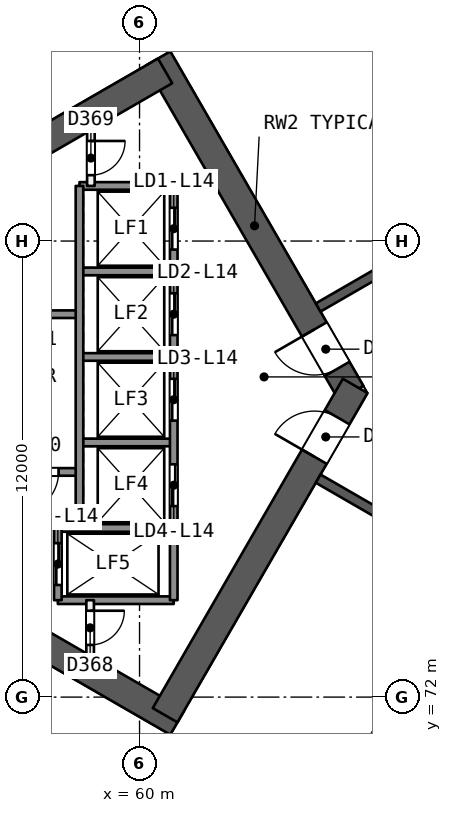
"""IFC4 building model, lengths in metres.
Left out: names, types, materials, properties, quantities, classifications, styles, units other than length and angle.
Written with IfcOpenShell. Run it as: python <this file> out.ifc"""

import sys

from ifc_helpers import new_model, si_unit, direction, frame, frame_2d, origin, place, context, subcontext, project, spatial, rectangle, extrude, element, fill, save


model = new_model("IFC4")
c1 = context("Model", 3, precision=1e-05, world=origin(), true_north=direction((0.0, 1.0)))
c2 = subcontext(c1, "Body", "Model", "MODEL_VIEW")
j1 = project(units=[si_unit("LENGTHUNIT", "METRE"), si_unit("PLANEANGLEUNIT", "RADIAN")], contexts=[c1])
p1 = place(None, origin())
s1 = spatial("IfcSite", under=j1, at=p1, CompositionType="ELEMENT")
p2 = place(p1, origin())
s2 = spatial("IfcBuilding", under=s1, at=p2, CompositionType="ELEMENT")
p3 = place(p2, frame((0.0, 0.0, 64.7)))
s3 = spatial("IfcBuildingStorey", under=s2, at=p3, CompositionType="ELEMENT", Elevation=64.7)
p4 = place(p3, frame((65.567, 80.0, 0.0), z_axis=(0.0, 0.0, 1.0), x_axis=(-0.499988615364, 0.866031976607, 0.0)))
e1 = element("IfcWall", 1, at=p4, inside=s3, PredefinedType="SHEAR", context=c2, shape_type="SweptSolid", body=[
    extrude(rectangle(XDim=10.163, YDim=0.75, at=frame_2d((5.082, 0.0))), origin(), (0.0, 0.0, 1.0), 3.7),
])
p5 = place(p4, frame((0.733, 0.0, 0.0)))
e2 = element("IfcOpeningElement", 2, at=p5, cuts=e1, PredefinedType="OPENING", context=c2, shape_type="SweptSolid", body=[
    extrude(rectangle(XDim=1.2, YDim=2.1, at=frame_2d((0.6, 1.05))), frame((0.0, 0.385, 0.0), z_axis=(0.0, -1.0, 0.0), x_axis=(1.0, 0.0, 0.0)), (0.0, 0.0, 1.0), 0.771),
])
p6 = place(p3, frame((60.673, 88.477, 0.0), z_axis=(0.0, 0.0, 1.0), x_axis=(-0.8660248072, -0.500001033313, 0.0)))
e3 = element("IfcWall", 3, at=p6, inside=s3, PredefinedType="SHEAR", context=c2, shape_type="SweptSolid", body=[
    extrude(rectangle(XDim=13.958, YDim=0.75, at=frame_2d((6.979, 0.0))), origin(), (0.0, 0.0, 1.0), 3.7),
])
p7 = place(p3, frame((48.772, 78.394, 0.0), z_axis=(0.0, 0.0, 1.0), x_axis=(0.866028339916, -0.499994914436, 0.0)))
e4 = element("IfcWall", 4, at=p7, inside=s3, PredefinedType="SHEAR", context=c2, shape_type="SweptSolid", body=[
    extrude(rectangle(XDim=14.117, YDim=0.75, at=frame_2d((7.059, 0.0))), origin(), (0.0, 0.0, 1.0), 3.7),
])
p8 = place(p3, frame((60.673, 71.523, 0.0), z_axis=(0.0, 0.0, 1.0), x_axis=(0.499997052475, 0.866027105532, 0.0)))
e5 = element("IfcWall", 5, at=p8, inside=s3, PredefinedType="SHEAR", context=c2, shape_type="SweptSolid", body=[
    extrude(rectangle(XDim=10.005, YDim=0.75, at=frame_2d((5.002, 0.0))), origin(), (0.0, 0.0, 1.0), 3.7),
])
p9 = place(p8, frame((7.855, 0.0, 0.0)))
e6 = element("IfcOpeningElement", 6, at=p9, cuts=e5, PredefinedType="OPENING", context=c2, shape_type="SweptSolid", body=[
    extrude(rectangle(XDim=1.2, YDim=2.1, at=frame_2d((0.6, 1.05))), frame((0.0, 0.385, 0.0), z_axis=(0.0, -1.0, 0.0), x_axis=(1.0, 0.0, 0.0)), (0.0, 0.0, 1.0), 0.771),
])
p10 = place(p3, frame((78.2, 90.046, 0.0), z_axis=(0.0, 0.0, 1.0), x_axis=(-0.866026492143, -0.499998114903, 0.0)))
e7 = element("IfcWall", 7, at=p10, inside=s3, PredefinedType="SHEAR", context=c2, shape_type="SweptSolid", body=[
    extrude(rectangle(XDim=15.588, YDim=0.25, at=frame_2d((7.794, 0.0))), origin(), (0.0, 0.0, 1.0), 3.2),
])
p11 = place(p10, frame((2.618, 0.0, 0.0)))
e8 = element("IfcOpeningElement", 8, at=p11, cuts=e7, PredefinedType="OPENING", context=c2, shape_type="SweptSolid", body=[
    extrude(rectangle(XDim=1.0, YDim=2.1, at=frame_2d((0.5, 1.05))), frame((0.0, 0.135, 0.0), z_axis=(0.0, -1.0, 0.0), x_axis=(1.0, 0.0, 0.0)), (0.0, 0.0, 1.0), 0.271),
])
p12 = place(p10, frame((8.133, 0.0, 0.0)))
e9 = element("IfcOpeningElement", 9, at=p12, cuts=e7, PredefinedType="OPENING", context=c2, shape_type="SweptSolid", body=[
    extrude(rectangle(XDim=1.0, YDim=2.1, at=frame_2d((0.5, 1.05))), frame((0.0, 0.135, 0.0), z_axis=(0.0, -1.0, 0.0), x_axis=(1.0, 0.0, 0.0)), (0.0, 0.0, 1.0), 0.271),
])
p13 = place(p10, frame((11.971, 0.0, 0.0)))
e10 = element("IfcOpeningElement", 10, at=p13, cuts=e7, PredefinedType="OPENING", context=c2, shape_type="SweptSolid", body=[
    extrude(rectangle(XDim=1.0, YDim=2.1, at=frame_2d((0.5, 1.05))), frame((0.0, 0.135, 0.0), z_axis=(0.0, -1.0, 0.0), x_axis=(1.0, 0.0, 0.0)), (0.0, 0.0, 1.0), 0.271),
])
p14 = place(p3, frame((64.7, 77.748, 0.0), z_axis=(0.0, 0.0, 1.0), x_axis=(0.866026492143, -0.499998114903, 0.0)))
e11 = element("IfcWall", 11, at=p14, inside=s3, PredefinedType="SHEAR", context=c2, shape_type="SweptSolid", body=[
    extrude(rectangle(XDim=15.588, YDim=0.25, at=frame_2d((7.794, 0.0))), origin(), (0.0, 0.0, 1.0), 3.2),
])
p15 = place(p14, frame((1.838, 0.0, 0.0)))
e12 = element("IfcOpeningElement", 12, at=p15, cuts=e11, PredefinedType="OPENING", context=c2, shape_type="SweptSolid", body=[
    extrude(rectangle(XDim=1.0, YDim=2.1, at=frame_2d((0.5, 1.05))), frame((0.0, 0.135, 0.0), z_axis=(0.0, -1.0, 0.0), x_axis=(1.0, 0.0, 0.0)), (0.0, 0.0, 1.0), 0.271),
])
p16 = place(p14, frame((8.694, 0.0, 0.0)))
e13 = element("IfcOpeningElement", 13, at=p16, cuts=e11, PredefinedType="OPENING", context=c2, shape_type="SweptSolid", body=[
    extrude(rectangle(XDim=1.1, YDim=2.1, at=frame_2d((0.55, 1.05))), frame((0.0, 0.135, 0.0), z_axis=(0.0, -1.0, 0.0), x_axis=(1.0, 0.0, 0.0)), (0.0, 0.0, 1.0), 0.271),
])
p17 = place(p14, frame((12.75, 0.0, 0.0)))
e14 = element("IfcOpeningElement", 14, at=p17, cuts=e11, PredefinedType="OPENING", context=c2, shape_type="SweptSolid", body=[
    extrude(rectangle(XDim=1.0, YDim=2.1, at=frame_2d((0.5, 1.05))), frame((0.0, 0.135, 0.0), z_axis=(0.0, -1.0, 0.0), x_axis=(1.0, 0.0, 0.0)), (0.0, 0.0, 1.0), 0.271),
])
p18 = place(p3, frame((63.325, 97.104, 0.0), z_axis=(0.0, 0.0, 1.0), x_axis=(0.500006818652, -0.866021466998, 0.0)))
e15 = element("IfcWall", 15, at=p18, inside=s3, PredefinedType="PARTITIONING", context=c2, shape_type="SweptSolid", body=[
    extrude(rectangle(XDim=13.551, YDim=0.2, at=frame_2d((6.775, 0.0))), origin(), (0.0, 0.0, 1.0), 3.2),
])
p19 = place(p3, frame((61.975, 63.675, 0.0), z_axis=(0.0, 0.0, 1.0), x_axis=(0.499994206371, 0.866028748712, 0.0)))
e16 = element("IfcWall", 16, at=p19, inside=s3, PredefinedType="PARTITIONING", context=c2, shape_type="SweptSolid", body=[
    extrude(rectangle(XDim=10.551, YDim=0.2, at=frame_2d((5.275, 0.0))), origin(), (0.0, 0.0, 1.0), 3.2),
])
p20 = place(p3, frame((38.701, 83.06, 0.0), z_axis=(0.0, 0.0, 1.0), x_axis=(0.866026049211, 0.499998882086, 0.0)))
e17 = element("IfcWall", 17, at=p20, inside=s3, PredefinedType="SOLIDWALL", context=c2, shape_type="SweptSolid", body=[
    extrude(rectangle(XDim=59.811, YDim=0.3, at=frame_2d((29.905, 0.0))), origin(), (0.0, 0.0, 1.0), 3.2),
])
p21 = place(p20, frame((33.382, 0.0, 0.0)))
e18 = element("IfcOpeningElement", 18, at=p21, cuts=e17, PredefinedType="OPENING", context=c2, shape_type="SweptSolid", body=[
    extrude(rectangle(XDim=2.4, YDim=2.4, at=frame_2d((1.2, 1.2))), frame((0.0, 0.161, 0.0), z_axis=(0.0, -1.0, 0.0), x_axis=(1.0, 0.0, 0.0)), (0.0, 0.0, 1.0), 0.321),
])
p22 = place(p20, frame((46.394, 0.0, 0.0)))
e19 = element("IfcOpeningElement", 19, at=p22, cuts=e17, PredefinedType="OPENING", context=c2, shape_type="SweptSolid", body=[
    extrude(rectangle(XDim=2.4, YDim=2.4, at=frame_2d((1.2, 1.2))), frame((0.0, 0.161, 0.0), z_axis=(0.0, -1.0, 0.0), x_axis=(1.0, 0.0, 0.0)), (0.0, 0.0, 1.0), 0.321),
])
p23 = place(p20, frame((24.029, 0.0, 0.0)))
e20 = element("IfcOpeningElement", 20, at=p23, cuts=e17, PredefinedType="OPENING", context=c2, shape_type="SweptSolid", body=[
    extrude(rectangle(XDim=2.4, YDim=2.4, at=frame_2d((1.2, 1.2))), frame((0.0, 0.161, 0.0), z_axis=(0.0, -1.0, 0.0), x_axis=(1.0, 0.0, 0.0)), (0.0, 0.0, 1.0), 0.321),
])
p24 = place(p20, frame((11.002, 0.0, 0.0)))
e21 = element("IfcOpeningElement", 21, at=p24, cuts=e17, PredefinedType="OPENING", context=c2, shape_type="SweptSolid", body=[
    extrude(rectangle(XDim=2.4, YDim=2.4, at=frame_2d((1.2, 1.2))), frame((0.0, 0.161, 0.0), z_axis=(0.0, -1.0, 0.0), x_axis=(1.0, 0.0, 0.0)), (0.0, 0.0, 1.0), 0.321),
])
p25 = place(p20, frame((28.705, 0.0, 0.0)))
e22 = element("IfcOpeningElement", 22, at=p25, cuts=e17, PredefinedType="OPENING", context=c2, shape_type="SweptSolid", body=[
    extrude(rectangle(XDim=2.4, YDim=2.4, at=frame_2d((1.2, 1.2))), frame((0.0, 0.161, 0.0), z_axis=(0.0, -1.0, 0.0), x_axis=(1.0, 0.0, 0.0)), (0.0, 0.0, 1.0), 0.321),
])
p26 = place(p3, frame((90.499, 47.034, 0.0), z_axis=(0.0, 0.0, 1.0), x_axis=(-0.866026049211, 0.499998882086, 0.0)))
e23 = element("IfcWall", 23, at=p26, inside=s3, PredefinedType="SOLIDWALL", context=c2, shape_type="SweptSolid", body=[
    extrude(rectangle(XDim=59.811, YDim=0.3, at=frame_2d((29.905, 0.0))), origin(), (0.0, 0.0, 1.0), 3.2),
])
p27 = place(p26, frame((28.705, 0.0, 0.0)))
e24 = element("IfcOpeningElement", 24, at=p27, cuts=e23, PredefinedType="OPENING", context=c2, shape_type="SweptSolid", body=[
    extrude(rectangle(XDim=2.4, YDim=2.4, at=frame_2d((1.2, 1.2))), frame((0.0, 0.161, 0.0), z_axis=(0.0, -1.0, 0.0), x_axis=(1.0, 0.0, 0.0)), (0.0, 0.0, 1.0), 0.321),
])
p28 = place(p26, frame((34.161, 0.0, 0.0)))
e25 = element("IfcOpeningElement", 25, at=p28, cuts=e23, PredefinedType="OPENING", context=c2, shape_type="SweptSolid", body=[
    extrude(rectangle(XDim=2.4, YDim=2.4, at=frame_2d((1.2, 1.2))), frame((0.0, 0.161, 0.0), z_axis=(0.0, -1.0, 0.0), x_axis=(1.0, 0.0, 0.0)), (0.0, 0.0, 1.0), 0.321),
])
p29 = place(p26, frame((46.394, 0.0, 0.0)))
e26 = element("IfcOpeningElement", 26, at=p29, cuts=e23, PredefinedType="OPENING", context=c2, shape_type="SweptSolid", body=[
    extrude(rectangle(XDim=2.4, YDim=2.4, at=frame_2d((1.2, 1.2))), frame((0.0, 0.161, 0.0), z_axis=(0.0, -1.0, 0.0), x_axis=(1.0, 0.0, 0.0)), (0.0, 0.0, 1.0), 0.321),
])
p30 = place(p26, frame((23.249, 0.0, 0.0)))
e27 = element("IfcOpeningElement", 27, at=p30, cuts=e23, PredefinedType="OPENING", context=c2, shape_type="SweptSolid", body=[
    extrude(rectangle(XDim=2.4, YDim=2.4, at=frame_2d((1.2, 1.2))), frame((0.0, 0.161, 0.0), z_axis=(0.0, -1.0, 0.0), x_axis=(1.0, 0.0, 0.0)), (0.0, 0.0, 1.0), 0.321),
])
p31 = place(p26, frame((11.002, 0.0, 0.0)))
e28 = element("IfcOpeningElement", 28, at=p31, cuts=e23, PredefinedType="OPENING", context=c2, shape_type="SweptSolid", body=[
    extrude(rectangle(XDim=2.4, YDim=2.4, at=frame_2d((1.2, 1.2))), frame((0.0, 0.161, 0.0), z_axis=(0.0, -1.0, 0.0), x_axis=(1.0, 0.0, 0.0)), (0.0, 0.0, 1.0), 0.321),
])
for number, where, z_axis, x_axis in (
    (29, (60.9, 85.45, 0.0), (0.0, 0.0, 1.0), (-1.0, 0.0, 0.0)),
    (30, (60.9, 83.2, 0.0), (0.0, 0.0, 1.0), (-1.0, 0.0, 0.0)),
):
    element("IfcWall", number, at=place(p3, frame(where, z_axis=z_axis, x_axis=x_axis)), inside=s3, PredefinedType="SOLIDWALL", context=c2, shape_type="SweptSolid", body=[
        extrude(rectangle(XDim=2.48, YDim=0.2, at=frame_2d((1.24, 0.0))), origin(), (0.0, 0.0, 1.0), 3.2),
    ])
p32 = place(p3, frame((58.42, 82.075, 0.0), z_axis=(0.0, 0.0, 1.0), x_axis=(-1.0, 0.0, 0.0)))
e31 = element("IfcWall", 31, at=p32, inside=s3, PredefinedType="SOLIDWALL", context=c2, shape_type="SweptSolid", body=[
    extrude(rectangle(XDim=7.7, YDim=0.2, at=frame_2d((3.85, 0.0))), origin(), (0.0, 0.0, 1.0), 3.2),
])
for number, where, z_axis, x_axis in (
    (32, (60.9, 80.95, 0.0), (0.0, 0.0, 1.0), (-1.0, 0.0, 0.0)),
    (33, (60.9, 78.7, 0.0), (0.0, 0.0, 1.0), (-1.0, 0.0, 0.0)),
):
    element("IfcWall", number, at=place(p3, frame(where, z_axis=z_axis, x_axis=x_axis)), inside=s3, PredefinedType="SOLIDWALL", context=c2, shape_type="SweptSolid", body=[
        extrude(rectangle(XDim=2.48, YDim=0.2, at=frame_2d((1.24, 0.0))), origin(), (0.0, 0.0, 1.0), 3.2),
    ])
p33 = place(p3, frame((58.42, 77.925, 0.0), z_axis=(0.0, 0.0, 1.0), x_axis=(-1.0, 0.0, 0.0)))
e34 = element("IfcWall", 34, at=p33, inside=s3, PredefinedType="SOLIDWALL", context=c2, shape_type="SweptSolid", body=[
    extrude(rectangle(XDim=7.7, YDim=0.2, at=frame_2d((3.85, 0.0))), origin(), (0.0, 0.0, 1.0), 3.2),
])
p34 = place(p33, frame((0.55, 0.0, 0.0)))
e35 = element("IfcOpeningElement", 35, at=p34, cuts=e34, PredefinedType="OPENING", context=c2, shape_type="SweptSolid", body=[
    extrude(rectangle(XDim=1.1, YDim=2.1, at=frame_2d((0.55, 1.05))), frame((0.0, 0.11, 0.0), z_axis=(0.0, -1.0, 0.0), x_axis=(1.0, 0.0, 0.0)), (0.0, 0.0, 1.0), 0.221),
])
for number, where, z_axis, x_axis in (
    (36, (60.9, 76.45, 0.0), (0.0, 0.0, 1.0), (-1.0, 0.0, 0.0)),
    (37, (60.9, 74.55, 0.0), (0.0, 0.0, 1.0), (-1.0, 0.0, 0.0)),
):
    element("IfcWall", number, at=place(p3, frame(where, z_axis=z_axis, x_axis=x_axis)), inside=s3, PredefinedType="SOLIDWALL", context=c2, shape_type="SweptSolid", body=[
        extrude(rectangle(XDim=3.05, YDim=0.2, at=frame_2d((1.525, 0.0))), origin(), (0.0, 0.0, 1.0), 3.2),
    ])
p35 = place(p3, frame((60.9, 85.45, 0.0), z_axis=(0.0, 0.0, 1.0), x_axis=(0.0, -1.0, 0.0)))
e38 = element("IfcWall", 38, at=p35, inside=s3, PredefinedType="SOLIDWALL", context=c2, shape_type="SweptSolid", body=[
    extrude(rectangle(XDim=10.9, YDim=0.2, at=frame_2d((5.45, 0.0))), origin(), (0.0, 0.0, 1.0), 3.2),
])
p36 = place(p35, frame((0.575, 0.0, 0.0)))
e39 = element("IfcOpeningElement", 39, at=p36, cuts=e38, PredefinedType="OPENING", context=c2, shape_type="SweptSolid", body=[
    extrude(rectangle(XDim=1.1, YDim=2.1, at=frame_2d((0.55, 1.05))), frame((0.0, 0.11, 0.0), z_axis=(0.0, -1.0, 0.0), x_axis=(1.0, 0.0, 0.0)), (0.0, 0.0, 1.0), 0.221),
])
p37 = place(p35, frame((2.825, 0.0, 0.0)))
e40 = element("IfcOpeningElement", 40, at=p37, cuts=e38, PredefinedType="OPENING", context=c2, shape_type="SweptSolid", body=[
    extrude(rectangle(XDim=1.1, YDim=2.1, at=frame_2d((0.55, 1.05))), frame((0.0, 0.11, 0.0), z_axis=(0.0, -1.0, 0.0), x_axis=(1.0, 0.0, 0.0)), (0.0, 0.0, 1.0), 0.221),
])
p38 = place(p35, frame((5.075, 0.0, 0.0)))
e41 = element("IfcOpeningElement", 41, at=p38, cuts=e38, PredefinedType="OPENING", context=c2, shape_type="SweptSolid", body=[
    extrude(rectangle(XDim=1.1, YDim=2.1, at=frame_2d((0.55, 1.05))), frame((0.0, 0.11, 0.0), z_axis=(0.0, -1.0, 0.0), x_axis=(1.0, 0.0, 0.0)), (0.0, 0.0, 1.0), 0.221),
])
p39 = place(p35, frame((7.325, 0.0, 0.0)))
e42 = element("IfcOpeningElement", 42, at=p39, cuts=e38, PredefinedType="OPENING", context=c2, shape_type="SweptSolid", body=[
    extrude(rectangle(XDim=1.1, YDim=2.1, at=frame_2d((0.55, 1.05))), frame((0.0, 0.11, 0.0), z_axis=(0.0, -1.0, 0.0), x_axis=(1.0, 0.0, 0.0)), (0.0, 0.0, 1.0), 0.221),
])
p40 = place(p3, frame((58.72, 86.917, 0.0), z_axis=(0.0, 0.0, 1.0), x_axis=(0.0, -1.0, 0.0)))
e43 = element("IfcWall", 43, at=p40, inside=s3, PredefinedType="PARTITIONING", context=c2, shape_type="SweptSolid", body=[
    extrude(rectangle(XDim=1.467, YDim=0.2, at=frame_2d((0.733, 0.0))), origin(), (0.0, 0.0, 1.0), 3.2),
])
p41 = place(p40, frame((0.283, 0.0, 0.0)))
e44 = element("IfcOpeningElement", 44, at=p41, cuts=e43, PredefinedType="OPENING", context=c2, shape_type="SweptSolid", body=[
    extrude(rectangle(XDim=0.9, YDim=2.1, at=frame_2d((0.45, 1.05))), frame((0.0, 0.11, 0.0), z_axis=(0.0, -1.0, 0.0), x_axis=(1.0, 0.0, 0.0)), (0.0, 0.0, 1.0), 0.221),
])
p42 = place(p3, frame((58.7, 74.55, 0.0), z_axis=(0.0, 0.0, 1.0), x_axis=(0.0, -1.0, 0.0)))
e45 = element("IfcWall", 45, at=p42, inside=s3, PredefinedType="PARTITIONING", context=c2, shape_type="SweptSolid", body=[
    extrude(rectangle(XDim=1.455, YDim=0.2, at=frame_2d((0.728, 0.0))), origin(), (0.0, 0.0, 1.0), 3.2),
])
p43 = place(p42, frame((0.278, 0.0, 0.0)))
e46 = element("IfcOpeningElement", 46, at=p43, cuts=e45, PredefinedType="OPENING", context=c2, shape_type="SweptSolid", body=[
    extrude(rectangle(XDim=0.9, YDim=2.1, at=frame_2d((0.45, 1.05))), frame((0.0, 0.11, 0.0), z_axis=(0.0, -1.0, 0.0), x_axis=(1.0, 0.0, 0.0)), (0.0, 0.0, 1.0), 0.221),
])
p44 = place(p3, frame((58.42, 85.45, 0.0), z_axis=(0.0, 0.0, 1.0), x_axis=(0.0, -1.0, 0.0)))
e47 = element("IfcWall", 47, at=p44, inside=s3, PredefinedType="SOLIDWALL", context=c2, shape_type="SweptSolid", body=[
    extrude(rectangle(XDim=9.0, YDim=0.2, at=frame_2d((4.5, 0.0))), origin(), (0.0, 0.0, 1.0), 3.2),
])
p45 = place(p3, frame((57.85, 76.45, 0.0), z_axis=(0.0, 0.0, 1.0), x_axis=(0.0, -1.0, 0.0)))
e48 = element("IfcWall", 48, at=p45, inside=s3, PredefinedType="SOLIDWALL", context=c2, shape_type="SweptSolid", body=[
    extrude(rectangle(XDim=1.9, YDim=0.2, at=frame_2d((0.95, 0.0))), origin(), (0.0, 0.0, 1.0), 3.2),
])
p46 = place(p45, frame((0.4, 0.0, 0.0)))
e49 = element("IfcOpeningElement", 49, at=p46, cuts=e48, PredefinedType="OPENING", context=c2, shape_type="SweptSolid", body=[
    extrude(rectangle(XDim=1.1, YDim=2.1, at=frame_2d((0.55, 1.05))), frame((0.0, 0.11, 0.0), z_axis=(0.0, -1.0, 0.0), x_axis=(1.0, 0.0, 0.0)), (0.0, 0.0, 1.0), 0.221),
])
p47 = place(p5, origin())
e50 = element("IfcDoor", 50, at=p47, inside=s3, OperationType="SINGLE_SWING_RIGHT", PredefinedType="NOTDEFINED", context=c2, shape_type="SweptSolid", body=[
    extrude(rectangle(XDim=1.2, YDim=2.1, at=frame_2d((0.6, 1.05))), frame((0.0, 0.025, 0.0), z_axis=(0.0, -1.0, 0.0), x_axis=(1.0, 0.0, 0.0)), (0.0, 0.0, 1.0), 0.05),
])
fill(e2, e50)
p48 = place(p9, origin())
e51 = element("IfcDoor", 51, at=p48, inside=s3, OperationType="SINGLE_SWING_LEFT", PredefinedType="NOTDEFINED", context=c2, shape_type="SweptSolid", body=[
    extrude(rectangle(XDim=1.2, YDim=2.1, at=frame_2d((0.6, 1.05))), frame((0.0, 0.025, 0.0), z_axis=(0.0, -1.0, 0.0), x_axis=(1.0, 0.0, 0.0)), (0.0, 0.0, 1.0), 0.05),
])
fill(e6, e51)
p49 = place(p36, origin())
e52 = element("IfcDoor", 52, at=p49, inside=s3, OperationType="SLIDING_TO_RIGHT", PredefinedType="NOTDEFINED", context=c2, shape_type="SweptSolid", body=[
    extrude(rectangle(XDim=1.1, YDim=2.1, at=frame_2d((0.55, 1.05))), frame((0.0, 0.025, 0.0), z_axis=(0.0, -1.0, 0.0), x_axis=(1.0, 0.0, 0.0)), (0.0, 0.0, 1.0), 0.05),
])
fill(e39, e52)
p50 = place(p37, origin())
e53 = element("IfcDoor", 53, at=p50, inside=s3, OperationType="SLIDING_TO_LEFT", PredefinedType="NOTDEFINED", context=c2, shape_type="SweptSolid", body=[
    extrude(rectangle(XDim=1.1, YDim=2.1, at=frame_2d((0.55, 1.05))), frame((0.0, 0.025, 0.0), z_axis=(0.0, -1.0, 0.0), x_axis=(1.0, 0.0, 0.0)), (0.0, 0.0, 1.0), 0.05),
])
fill(e40, e53)
p51 = place(p38, origin())
e54 = element("IfcDoor", 54, at=p51, inside=s3, OperationType="SLIDING_TO_RIGHT", PredefinedType="NOTDEFINED", context=c2, shape_type="SweptSolid", body=[
    extrude(rectangle(XDim=1.1, YDim=2.1, at=frame_2d((0.55, 1.05))), frame((0.0, 0.025, 0.0), z_axis=(0.0, -1.0, 0.0), x_axis=(1.0, 0.0, 0.0)), (0.0, 0.0, 1.0), 0.05),
])
fill(e41, e54)
p52 = place(p39, origin())
e55 = element("IfcDoor", 55, at=p52, inside=s3, OperationType="SLIDING_TO_LEFT", PredefinedType="NOTDEFINED", context=c2, shape_type="SweptSolid", body=[
    extrude(rectangle(XDim=1.1, YDim=2.1, at=frame_2d((0.55, 1.05))), frame((0.0, 0.025, 0.0), z_axis=(0.0, -1.0, 0.0), x_axis=(1.0, 0.0, 0.0)), (0.0, 0.0, 1.0), 0.05),
])
fill(e42, e55)
p53 = place(p46, origin())
e56 = element("IfcDoor", 56, at=p53, inside=s3, OperationType="SLIDING_TO_RIGHT", PredefinedType="NOTDEFINED", context=c2, shape_type="SweptSolid", body=[
    extrude(rectangle(XDim=1.1, YDim=2.1, at=frame_2d((0.55, 1.05))), frame((0.0, 0.025, 0.0), z_axis=(0.0, -1.0, 0.0), x_axis=(1.0, 0.0, 0.0)), (0.0, 0.0, 1.0), 0.05),
])
fill(e49, e56)
p54 = place(p43, origin())
e57 = element("IfcDoor", 57, at=p54, inside=s3, OperationType="SINGLE_SWING_LEFT", PredefinedType="NOTDEFINED", context=c2, shape_type="SweptSolid", body=[
    extrude(rectangle(XDim=0.9, YDim=2.1, at=frame_2d((0.45, 1.05))), frame((0.0, 0.025, 0.0), z_axis=(0.0, -1.0, 0.0), x_axis=(1.0, 0.0, 0.0)), (0.0, 0.0, 1.0), 0.05),
])
fill(e46, e57)
p55 = place(p41, origin())
e58 = element("IfcDoor", 58, at=p55, inside=s3, OperationType="SINGLE_SWING_LEFT", PredefinedType="NOTDEFINED", context=c2, shape_type="SweptSolid", body=[
    extrude(rectangle(XDim=0.9, YDim=2.1, at=frame_2d((0.45, 1.05))), frame((0.0, 0.025, 0.0), z_axis=(0.0, -1.0, 0.0), x_axis=(1.0, 0.0, 0.0)), (0.0, 0.0, 1.0), 0.05),
])
fill(e44, e58)
p56 = place(p34, origin())
e59 = element("IfcDoor", 59, at=p56, inside=s3, OperationType="SINGLE_SWING_RIGHT", PredefinedType="NOTDEFINED", context=c2, shape_type="SweptSolid", body=[
    extrude(rectangle(XDim=1.1, YDim=2.1, at=frame_2d((0.55, 1.05))), frame((0.0, 0.025, 0.0), z_axis=(0.0, -1.0, 0.0), x_axis=(1.0, 0.0, 0.0)), (0.0, 0.0, 1.0), 0.05),
])
fill(e35, e59)
save(model, sys.argv[1])
